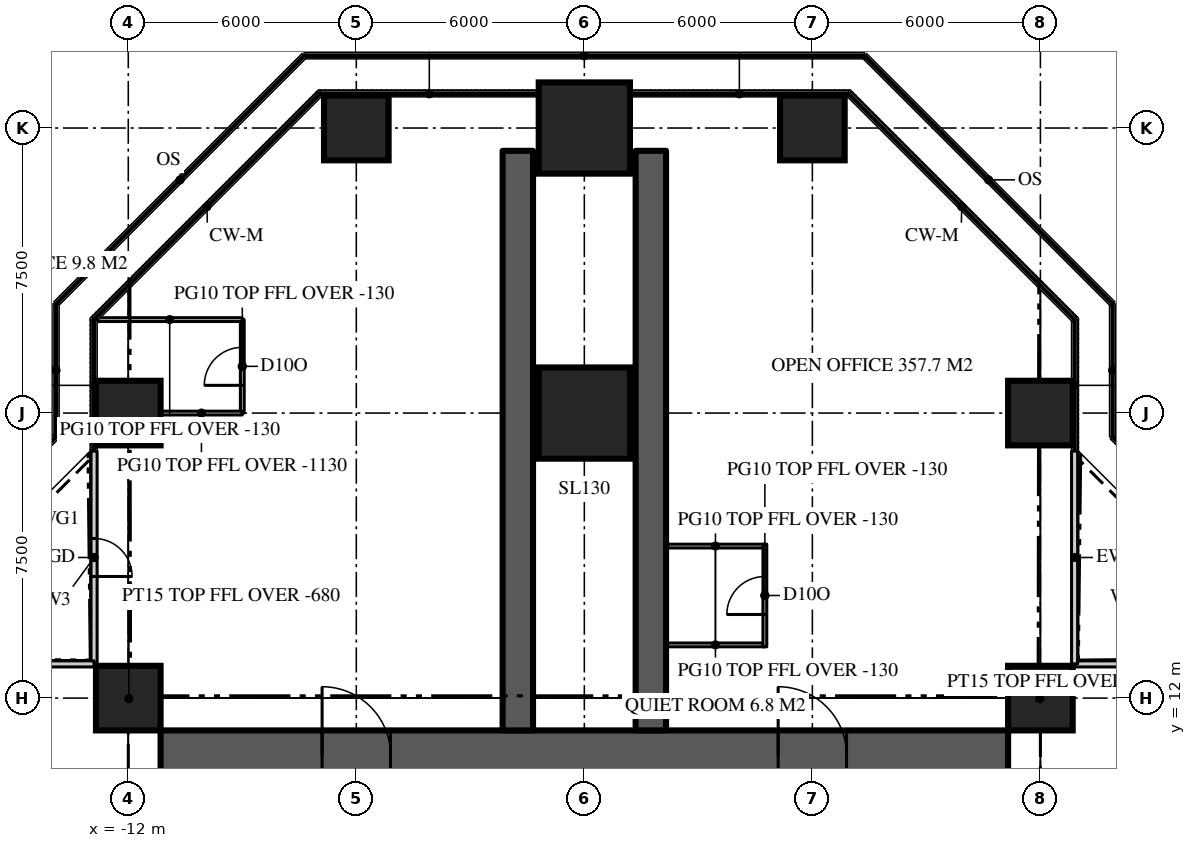
"""IFC4 building model, lengths in metres.
Left out: names, types, materials, properties, quantities, classifications, styles, units other than length and angle.
Written with IfcOpenShell. Run it as: python <this file> out.ifc"""

import sys

from ifc_helpers import new_model, si_unit, direction, frame, frame_2d, origin, origin_2d, place, context, subcontext, project, spatial, rectangle, extrude, element, fill, save


model = new_model("IFC4")
c1 = context("Model", 3, precision=1e-05, world=origin(), true_north=direction((0.0, 1.0)))
c2 = subcontext(c1, "Body", "Model", "MODEL_VIEW")
j1 = project(units=[si_unit("LENGTHUNIT", "METRE"), si_unit("PLANEANGLEUNIT", "RADIAN")], contexts=[c1])
p1 = place(None, origin())
s1 = spatial("IfcSite", under=j1, at=p1, CompositionType="ELEMENT")
p2 = place(p1, origin())
s2 = spatial("IfcBuilding", under=s1, at=p2, CompositionType="ELEMENT")
p3 = place(p2, frame((0.0, 0.0, 147.6)))
s3 = spatial("IfcBuildingStorey", under=s2, at=p3, CompositionType="ELEMENT", Elevation=147.6)
p4 = place(p3, frame((-11.15, 10.5, 0.0), z_axis=(0.0, 0.0, 1.0), x_axis=(1.0, 0.0, 0.0)))
e1 = element("IfcWall", 1, at=p4, inside=s3, PredefinedType="SHEAR", context=c2, shape_type="SweptSolid", body=[
    extrude(rectangle(XDim=22.3, YDim=1.3, at=frame_2d((11.15, 0.0))), origin(), (0.0, 0.0, 1.0), 3.9),
])
p5 = place(p4, frame((4.25, 0.0, 0.0)))
e2 = element("IfcOpeningElement", 2, at=p5, cuts=e1, PredefinedType="OPENING", context=c2, shape_type="SweptSolid", body=[
    extrude(rectangle(XDim=1.8, YDim=2.2, at=frame_2d((0.9, 1.1))), frame((0.0, 0.66, 0.0), z_axis=(0.0, -1.0, 0.0), x_axis=(1.0, 0.0, 0.0)), (0.0, 0.0, 1.0), 1.32),
])
p6 = place(p4, frame((16.25, 0.0, 0.0)))
e3 = element("IfcOpeningElement", 3, at=p6, cuts=e1, PredefinedType="OPENING", context=c2, shape_type="SweptSolid", body=[
    extrude(rectangle(XDim=1.8, YDim=2.2, at=frame_2d((0.9, 1.1))), frame((0.0, 0.66, 0.0), z_axis=(0.0, -1.0, 0.0), x_axis=(1.0, 0.0, 0.0)), (0.0, 0.0, 1.0), 1.32),
])
for number, where, z_axis, x_axis in (
    (4, (1.75, 11.15, 0.0), (0.0, 0.0, 1.0), (0.0, 1.0, 0.0)),
    (5, (-1.75, 11.15, 0.0), (0.0, 0.0, 1.0), (0.0, 1.0, 0.0)),
):
    element("IfcWall", number, at=place(p3, frame(where, z_axis=z_axis, x_axis=x_axis)), inside=s3, PredefinedType="SHEAR", context=c2, shape_type="SweptSolid", body=[
        extrude(rectangle(XDim=15.25, YDim=0.8, at=frame_2d((7.625, 0.0))), origin(), (0.0, 0.0, 1.0), 3.9),
    ])
for number, where, z_axis, x_axis in (
    (6, (-12.0, 12.0, 0.0), (0.0, 0.0, 1.0), (1.0, 0.0, 0.0)),
    (7, (12.0, 12.0, 0.0), (0.0, 0.0, 1.0), (1.0, 0.0, 0.0)),
    (8, (-12.0, 19.5, 0.0), (0.0, 0.0, 1.0), (1.0, 0.0, 0.0)),
):
    element("IfcColumn", number, at=place(p3, frame(where, z_axis=z_axis, x_axis=x_axis)), inside=s3, PredefinedType="COLUMN", context=c2, shape_type="SweptSolid", body=[
        extrude(rectangle(XDim=1.7, YDim=1.7, at=origin_2d()), origin(), (0.0, 0.0, 1.0), 3.9),
    ])
p7 = place(p3, frame((0.0, 19.5, 0.0), z_axis=(0.0, 0.0, 1.0), x_axis=(1.0, 0.0, 0.0)))
e9 = element("IfcColumn", 9, at=p7, inside=s3, PredefinedType="COLUMN", context=c2, shape_type="SweptSolid", body=[
    extrude(rectangle(XDim=2.4, YDim=2.4, at=origin_2d()), origin(), (0.0, 0.0, 1.0), 3.9),
])
for number, where, z_axis, x_axis in (
    (10, (12.0, 19.5, 0.0), (0.0, 0.0, 1.0), (1.0, 0.0, 0.0)),
    (11, (-6.0, 27.0, 0.0), (0.0, 0.0, 1.0), (1.0, 0.0, 0.0)),
):
    element("IfcColumn", number, at=place(p3, frame(where, z_axis=z_axis, x_axis=x_axis)), inside=s3, PredefinedType="COLUMN", context=c2, shape_type="SweptSolid", body=[
        extrude(rectangle(XDim=1.7, YDim=1.7, at=origin_2d()), origin(), (0.0, 0.0, 1.0), 3.9),
    ])
p8 = place(p3, frame((0.0, 27.0, 0.0), z_axis=(0.0, 0.0, 1.0), x_axis=(1.0, 0.0, 0.0)))
e12 = element("IfcColumn", 12, at=p8, inside=s3, PredefinedType="COLUMN", context=c2, shape_type="SweptSolid", body=[
    extrude(rectangle(XDim=2.4, YDim=2.4, at=origin_2d()), origin(), (0.0, 0.0, 1.0), 3.9),
])
p9 = place(p3, frame((6.0, 27.0, 0.0), z_axis=(0.0, 0.0, 1.0), x_axis=(1.0, 0.0, 0.0)))
e13 = element("IfcColumn", 13, at=p9, inside=s3, PredefinedType="COLUMN", context=c2, shape_type="SweptSolid", body=[
    extrude(rectangle(XDim=1.7, YDim=1.7, at=origin_2d()), origin(), (0.0, 0.0, 1.0), 3.9),
])
p10 = place(p3, frame((18.5, 12.9, 0.0), z_axis=(0.0, 0.0, 1.0), x_axis=(-1.0, 0.0, 0.0)))
e14 = element("IfcWall", 14, at=p10, inside=s3, PredefinedType="SOLIDWALL", context=c2, shape_type="SweptSolid", body=[
    extrude(rectangle(XDim=5.6, YDim=0.16, at=frame_2d((2.8, 0.0))), origin(), (0.0, 0.0, 1.0), 3.77),
])
p11 = place(p10, frame((2.3, 0.0, 0.0)))
e15 = element("IfcOpeningElement", 15, at=p11, cuts=e14, PredefinedType="OPENING", context=c2, shape_type="SweptSolid", body=[
    extrude(rectangle(XDim=1.0, YDim=2.2, at=frame_2d((0.5, 1.1))), frame((0.0, 0.09, 0.0), z_axis=(0.0, -1.0, 0.0), x_axis=(1.0, 0.0, 0.0)), (0.0, 0.0, 1.0), 0.18),
])
p12 = place(p3, frame((12.9, 12.9, 0.0), z_axis=(0.0, 0.0, 1.0), x_axis=(0.0, 1.0, 0.0)))
e16 = element("IfcWall", 16, at=p12, inside=s3, PredefinedType="SOLIDWALL", context=c2, shape_type="SweptSolid", body=[
    extrude(rectangle(XDim=5.6, YDim=0.16, at=frame_2d((2.8, 0.0))), origin(), (0.0, 0.0, 1.0), 3.77),
])
p13 = place(p3, frame((-12.9, 18.5, 0.0), z_axis=(0.0, 0.0, 1.0), x_axis=(0.0, -1.0, 0.0)))
e17 = element("IfcWall", 17, at=p13, inside=s3, PredefinedType="SOLIDWALL", context=c2, shape_type="SweptSolid", body=[
    extrude(rectangle(XDim=5.6, YDim=0.16, at=frame_2d((2.8, 0.0))), origin(), (0.0, 0.0, 1.0), 3.77),
])
p14 = place(p13, frame((2.3, 0.0, 0.0)))
e18 = element("IfcOpeningElement", 18, at=p14, cuts=e17, PredefinedType="OPENING", context=c2, shape_type="SweptSolid", body=[
    extrude(rectangle(XDim=1.0, YDim=2.2, at=frame_2d((0.5, 1.1))), frame((0.0, 0.09, 0.0), z_axis=(0.0, -1.0, 0.0), x_axis=(1.0, 0.0, 0.0)), (0.0, 0.0, 1.0), 0.18),
])
p15 = place(p3, frame((-12.9, 12.9, 0.0), z_axis=(0.0, 0.0, 1.0), x_axis=(-1.0, 0.0, 0.0)))
e19 = element("IfcWall", 19, at=p15, inside=s3, PredefinedType="SOLIDWALL", context=c2, shape_type="SweptSolid", body=[
    extrude(rectangle(XDim=5.6, YDim=0.16, at=frame_2d((2.8, 0.0))), origin(), (0.0, 0.0, 1.0), 3.77),
])
p16 = place(p3, frame((-9.0, 19.5, 0.0), z_axis=(0.0, 0.0, 1.0), x_axis=(0.0, 1.0, 0.0)))
e20 = element("IfcWall", 20, at=p16, inside=s3, PredefinedType="PARTITIONING", context=c2, shape_type="SweptSolid", body=[
    extrude(rectangle(XDim=2.459, YDim=0.1, at=frame_2d((1.229, 0.0))), origin(), (0.0, 0.0, 1.0), 3.77),
])
p17 = place(p16, frame((0.729, 0.0, 0.0)))
e21 = element("IfcOpeningElement", 21, at=p17, cuts=e20, PredefinedType="OPENING", context=c2, shape_type="SweptSolid", body=[
    extrude(rectangle(XDim=1.0, YDim=2.2, at=frame_2d((0.5, 1.1))), frame((0.0, 0.06, 0.0), z_axis=(0.0, -1.0, 0.0), x_axis=(1.0, 0.0, 0.0)), (0.0, 0.0, 1.0), 0.12),
])
p18 = place(p3, frame((-9.0, 19.5, 0.0), z_axis=(0.0, 0.0, 1.0), x_axis=(-1.0, 0.0, 0.0)))
e22 = element("IfcWall", 22, at=p18, inside=s3, PredefinedType="PARTITIONING", context=c2, shape_type="SweptSolid", body=[
    extrude(rectangle(XDim=2.15, YDim=0.1, at=frame_2d((1.075, 0.0))), origin(), (0.0, 0.0, 1.0), 2.77),
])
p19 = place(p3, frame((-9.0, 21.959, 0.0), z_axis=(0.0, 0.0, 1.0), x_axis=(-1.0, 0.0, 0.0)))
e23 = element("IfcWall", 23, at=p19, inside=s3, PredefinedType="PARTITIONING", context=c2, shape_type="SweptSolid", body=[
    extrude(rectangle(XDim=3.82, YDim=0.1, at=frame_2d((1.91, 0.0))), origin(), (0.0, 0.0, 1.0), 3.77),
])
for number, where, z_axis, x_axis in (
    (24, (2.15, 13.4, 0.0), (0.0, 0.0, 1.0), (1.0, 0.0, 0.0)),
    (25, (2.15, 16.0, 0.0), (0.0, 0.0, 1.0), (1.0, 0.0, 0.0)),
):
    element("IfcWall", number, at=place(p3, frame(where, z_axis=z_axis, x_axis=x_axis)), inside=s3, PredefinedType="PARTITIONING", context=c2, shape_type="SweptSolid", body=[
        extrude(rectangle(XDim=2.6, YDim=0.1, at=frame_2d((1.3, 0.0))), origin(), (0.0, 0.0, 1.0), 3.77),
    ])
p20 = place(p3, frame((4.75, 13.35, 0.0), z_axis=(0.0, 0.0, 1.0), x_axis=(0.0, 1.0, 0.0)))
e26 = element("IfcWall", 26, at=p20, inside=s3, PredefinedType="PARTITIONING", context=c2, shape_type="SweptSolid", body=[
    extrude(rectangle(XDim=2.7, YDim=0.1, at=frame_2d((1.35, 0.0))), origin(), (0.0, 0.0, 1.0), 3.77),
])
p21 = place(p20, frame((0.85, 0.0, 0.0)))
e27 = element("IfcOpeningElement", 27, at=p21, cuts=e26, PredefinedType="OPENING", context=c2, shape_type="SweptSolid", body=[
    extrude(rectangle(XDim=1.0, YDim=2.2, at=frame_2d((0.5, 1.1))), frame((0.0, 0.06, 0.0), z_axis=(0.0, -1.0, 0.0), x_axis=(1.0, 0.0, 0.0)), (0.0, 0.0, 1.0), 0.12),
])
for number, where, z_axis, x_axis in (
    (28, (11.15, 11.15, 0.0), (0.0, 0.0, 1.0), (0.707, 0.707, 0.0)),
    (29, (-11.15, 11.15, 0.0), (0.0, 0.0, 1.0), (-0.707, 0.707, 0.0)),
):
    element("IfcWall", number, at=place(p3, frame(where, z_axis=z_axis, x_axis=x_axis)), inside=s3, PredefinedType="PARTITIONING", context=c2, shape_type="SweptSolid", body=[
        extrude(rectangle(XDim=2.362, YDim=0.15, at=frame_2d((1.181, 0.0))), origin(), (0.0, 0.0, 1.0), 3.22),
    ])
p22 = place(p14, origin())
e30 = element("IfcDoor", 30, at=p22, inside=s3, OperationType="SINGLE_SWING_RIGHT", PredefinedType="DOOR", context=c2, shape_type="SweptSolid", body=[
    extrude(rectangle(XDim=1.0, YDim=2.2, at=frame_2d((0.5, 1.1))), frame((0.0, 0.025, 0.0), z_axis=(0.0, -1.0, 0.0), x_axis=(1.0, 0.0, 0.0)), (0.0, 0.0, 1.0), 0.05),
])
fill(e18, e30)
p23 = place(p5, origin())
e31 = element("IfcDoor", 31, at=p23, inside=s3, OperationType="DOUBLE_DOOR_DOUBLE_SWING", PredefinedType="DOOR", context=c2, shape_type="SweptSolid", body=[
    extrude(rectangle(XDim=1.8, YDim=2.2, at=frame_2d((0.9, 1.1))), frame((0.0, 0.025, 0.0), z_axis=(0.0, -1.0, 0.0), x_axis=(1.0, 0.0, 0.0)), (0.0, 0.0, 1.0), 0.05),
])
fill(e2, e31)
p24 = place(p6, origin())
e32 = element("IfcDoor", 32, at=p24, inside=s3, OperationType="DOUBLE_DOOR_DOUBLE_SWING", PredefinedType="DOOR", context=c2, shape_type="SweptSolid", body=[
    extrude(rectangle(XDim=1.8, YDim=2.2, at=frame_2d((0.9, 1.1))), frame((0.0, 0.025, 0.0), z_axis=(0.0, -1.0, 0.0), x_axis=(1.0, 0.0, 0.0)), (0.0, 0.0, 1.0), 0.05),
])
fill(e3, e32)
p25 = place(p17, origin())
e33 = element("IfcDoor", 33, at=p25, inside=s3, OperationType="SINGLE_SWING_LEFT", PredefinedType="DOOR", context=c2, shape_type="SweptSolid", body=[
    extrude(rectangle(XDim=1.0, YDim=2.2, at=frame_2d((0.5, 1.1))), frame((0.0, 0.025, 0.0), z_axis=(0.0, -1.0, 0.0), x_axis=(1.0, 0.0, 0.0)), (0.0, 0.0, 1.0), 0.05),
])
fill(e21, e33)
p26 = place(p21, origin())
e34 = element("IfcDoor", 34, at=p26, inside=s3, OperationType="SINGLE_SWING_LEFT", PredefinedType="DOOR", context=c2, shape_type="SweptSolid", body=[
    extrude(rectangle(XDim=1.0, YDim=2.2, at=frame_2d((0.5, 1.1))), frame((0.0, 0.025, 0.0), z_axis=(0.0, -1.0, 0.0), x_axis=(1.0, 0.0, 0.0)), (0.0, 0.0, 1.0), 0.05),
])
fill(e27, e34)
save(model, sys.argv[1])
